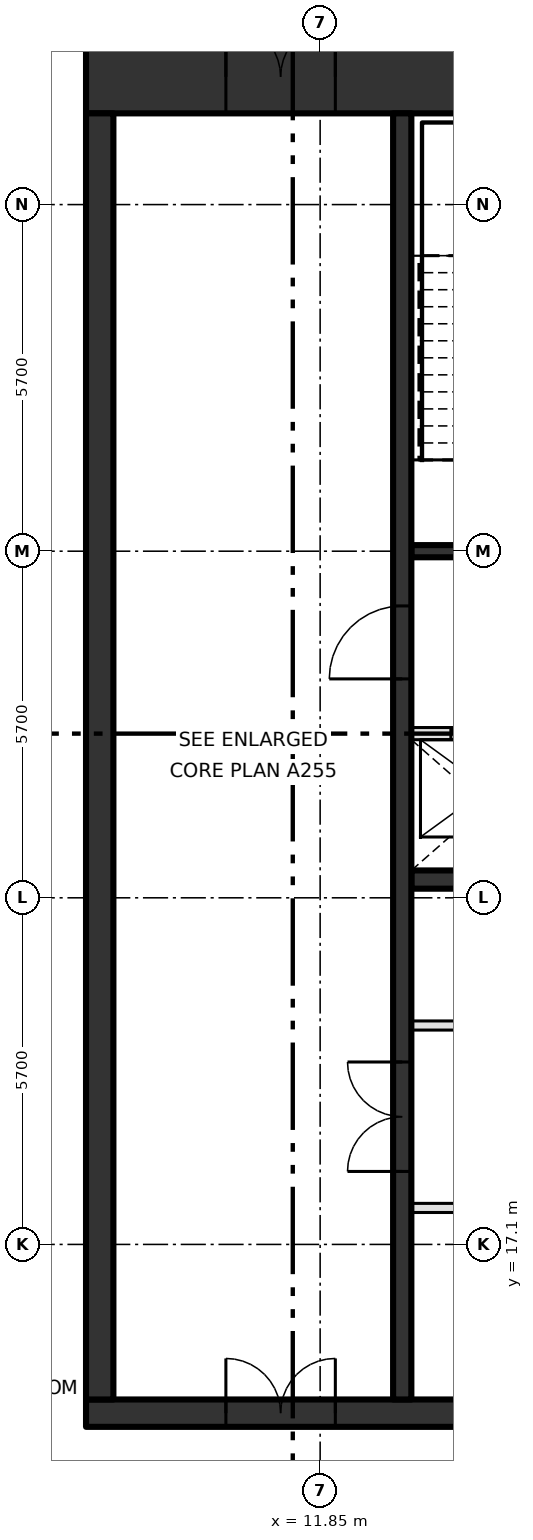
"""IFC4 building model, lengths in metres.
Left out: names, types, materials, properties, quantities, classifications, styles, units other than length and angle.
Written with IfcOpenShell. Run it as: python <this file> out.ifc"""

import sys

from ifc_helpers import new_model, si_unit, direction, frame, frame_2d, origin, place, context, subcontext, project, spatial, rectangle, extrude, element, fill, save


model = new_model("IFC4")
c1 = context("Model", 3, precision=1e-05, world=origin(), true_north=direction((0.0, 1.0)))
c2 = subcontext(c1, "Body", "Model", "MODEL_VIEW")
j1 = project(units=[si_unit("LENGTHUNIT", "METRE"), si_unit("PLANEANGLEUNIT", "RADIAN")], contexts=[c1])
p1 = place(None, origin())
s1 = spatial("IfcSite", under=j1, at=p1, CompositionType="ELEMENT")
p2 = place(p1, origin())
s2 = spatial("IfcBuilding", under=s1, at=p2, CompositionType="ELEMENT")
p3 = place(p2, frame((0.0, 0.0, 405.0)))
s3 = spatial("IfcBuildingStorey", under=s2, at=p3, CompositionType="ELEMENT", Elevation=405.0)
p4 = place(p3, frame((8.0, 14.325, -0.3), z_axis=(0.0, 0.0, 1.0), x_axis=(1.0, 0.0, 0.0)))
e1 = element("IfcWall", 1, at=p4, inside=s3, PredefinedType="SHEAR", context=c2, shape_type="SweptSolid", body=[
    extrude(rectangle(XDim=22.8, YDim=0.45, at=frame_2d((11.4, 0.0))), origin(), (0.0, 0.0, 1.0), 4.65),
])
p5 = place(p4, frame((2.3, 0.0, 0.3)))
e2 = element("IfcOpeningElement", 2, at=p5, cuts=e1, PredefinedType="OPENING", context=c2, shape_type="SweptSolid", body=[
    extrude(rectangle(XDim=1.8, YDim=2.1, at=frame_2d((0.9, 1.05))), frame((0.0, 0.235, 0.0), z_axis=(0.0, -1.0, 0.0), x_axis=(1.0, 0.0, 0.0)), (0.0, 0.0, 1.0), 0.47),
])
p6 = place(p3, frame((8.0, 36.3, -0.3), z_axis=(0.0, 0.0, 1.0), x_axis=(1.0, 0.0, 0.0)))
e3 = element("IfcWall", 3, at=p6, inside=s3, PredefinedType="SHEAR", context=c2, shape_type="SweptSolid", body=[
    extrude(rectangle(XDim=22.8, YDim=1.2, at=frame_2d((11.4, 0.0))), origin(), (0.0, 0.0, 1.0), 4.65),
])
p7 = place(p6, frame((2.3, 0.0, 0.3)))
e4 = element("IfcOpeningElement", 4, at=p7, cuts=e3, PredefinedType="OPENING", context=c2, shape_type="SweptSolid", body=[
    extrude(rectangle(XDim=1.8, YDim=2.1, at=frame_2d((0.9, 1.05))), frame((0.0, 0.61, 0.0), z_axis=(0.0, -1.0, 0.0), x_axis=(1.0, 0.0, 0.0)), (0.0, 0.0, 1.0), 1.22),
])
p8 = place(p3, frame((8.225, 14.55, -0.3), z_axis=(0.0, 0.0, 1.0), x_axis=(0.0, 1.0, 0.0)))
e5 = element("IfcWall", 5, at=p8, inside=s3, PredefinedType="SHEAR", context=c2, shape_type="SweptSolid", body=[
    extrude(rectangle(XDim=21.15, YDim=0.45, at=frame_2d((10.575, 0.0))), origin(), (0.0, 0.0, 1.0), 4.65),
])
p9 = place(p3, frame((13.35, 17.7, 0.0), z_axis=(0.0, 0.0, 1.0), x_axis=(1.0, 0.0, 0.0)))
e6 = element("IfcWall", 6, at=p9, inside=s3, PredefinedType="PARTITIONING", context=c2, shape_type="SweptSolid", body=[
    extrude(rectangle(XDim=13.425, YDim=0.15, at=frame_2d((6.712, 0.0))), origin(), (0.0, 0.0, 1.0), 4.35),
])
p10 = place(p9, frame((4.8, 0.0, 0.0)))
e7 = element("IfcOpeningElement", 7, at=p10, cuts=e6, PredefinedType="OPENING", context=c2, shape_type="SweptSolid", body=[
    extrude(rectangle(XDim=0.9, YDim=2.1, at=frame_2d((0.45, 1.05))), frame((0.0, 0.085, 0.0), z_axis=(0.0, -1.0, 0.0), x_axis=(1.0, 0.0, 0.0)), (0.0, 0.0, 1.0), 0.17),
])
p11 = place(p9, frame((11.55, 0.0, 0.0)))
e8 = element("IfcOpeningElement", 8, at=p11, cuts=e6, PredefinedType="OPENING", context=c2, shape_type="SweptSolid", body=[
    extrude(rectangle(XDim=0.9, YDim=2.1, at=frame_2d((0.45, 1.05))), frame((0.0, 0.085, 0.0), z_axis=(0.0, -1.0, 0.0), x_axis=(1.0, 0.0, 0.0)), (0.0, 0.0, 1.0), 0.17),
])
p12 = place(p3, frame((13.35, 20.7, 0.0), z_axis=(0.0, 0.0, 1.0), x_axis=(1.0, 0.0, 0.0)))
e9 = element("IfcWall", 9, at=p12, inside=s3, PredefinedType="PARTITIONING", context=c2, shape_type="SweptSolid", body=[
    extrude(rectangle(XDim=13.425, YDim=0.15, at=frame_2d((6.712, 0.0))), origin(), (0.0, 0.0, 1.0), 4.35),
])
p13 = place(p12, frame((6.15, 0.0, 0.0)))
e10 = element("IfcOpeningElement", 10, at=p13, cuts=e9, PredefinedType="OPENING", context=c2, shape_type="SweptSolid", body=[
    extrude(rectangle(XDim=0.9, YDim=2.1, at=frame_2d((0.45, 1.05))), frame((0.0, 0.085, 0.0), z_axis=(0.0, -1.0, 0.0), x_axis=(1.0, 0.0, 0.0)), (0.0, 0.0, 1.0), 0.17),
])
p14 = place(p3, frame((13.35, 23.1, 0.0), z_axis=(0.0, 0.0, 1.0), x_axis=(1.0, 0.0, 0.0)))
e11 = element("IfcWall", 11, at=p14, inside=s3, PredefinedType="SHEAR", context=c2, shape_type="SweptSolid", body=[
    extrude(rectangle(XDim=17.0, YDim=0.3, at=frame_2d((8.5, 0.0))), origin(), (0.0, 0.0, 1.0), 4.35),
])
p15 = place(p3, frame((13.35, 25.5, 0.0), z_axis=(0.0, 0.0, 1.0), x_axis=(1.0, 0.0, 0.0)))
e12 = element("IfcWall", 12, at=p15, inside=s3, PredefinedType="SOLIDWALL", context=c2, shape_type="SweptSolid", body=[
    extrude(rectangle(XDim=17.0, YDim=0.2, at=frame_2d((8.5, 0.0))), origin(), (0.0, 0.0, 1.0), 4.35),
])
p16 = place(p15, frame((0.65, 0.0, 0.0)))
e13 = element("IfcOpeningElement", 13, at=p16, cuts=e12, PredefinedType="OPENING", context=c2, shape_type="SweptSolid", body=[
    extrude(rectangle(XDim=1.1, YDim=2.1, at=frame_2d((0.55, 1.05))), frame((0.0, 0.11, 0.0), z_axis=(0.0, -1.0, 0.0), x_axis=(1.0, 0.0, 0.0)), (0.0, 0.0, 1.0), 0.22),
])
p17 = place(p15, frame((3.35, 0.0, 0.0)))
e14 = element("IfcOpeningElement", 14, at=p17, cuts=e12, PredefinedType="OPENING", context=c2, shape_type="SweptSolid", body=[
    extrude(rectangle(XDim=1.1, YDim=2.1, at=frame_2d((0.55, 1.05))), frame((0.0, 0.11, 0.0), z_axis=(0.0, -1.0, 0.0), x_axis=(1.0, 0.0, 0.0)), (0.0, 0.0, 1.0), 0.22),
])
p18 = place(p15, frame((6.05, 0.0, 0.0)))
e15 = element("IfcOpeningElement", 15, at=p18, cuts=e12, PredefinedType="OPENING", context=c2, shape_type="SweptSolid", body=[
    extrude(rectangle(XDim=1.1, YDim=2.1, at=frame_2d((0.55, 1.05))), frame((0.0, 0.11, 0.0), z_axis=(0.0, -1.0, 0.0), x_axis=(1.0, 0.0, 0.0)), (0.0, 0.0, 1.0), 0.22),
])
p19 = place(p15, frame((8.75, 0.0, 0.0)))
e16 = element("IfcOpeningElement", 16, at=p19, cuts=e12, PredefinedType="OPENING", context=c2, shape_type="SweptSolid", body=[
    extrude(rectangle(XDim=1.1, YDim=2.1, at=frame_2d((0.55, 1.05))), frame((0.0, 0.11, 0.0), z_axis=(0.0, -1.0, 0.0), x_axis=(1.0, 0.0, 0.0)), (0.0, 0.0, 1.0), 0.22),
])
p20 = place(p15, frame((13.0, 0.0, 0.0)))
e17 = element("IfcOpeningElement", 17, at=p20, cuts=e12, PredefinedType="OPENING", context=c2, shape_type="SweptSolid", body=[
    extrude(rectangle(XDim=0.9, YDim=2.1, at=frame_2d((0.45, 1.05))), frame((0.0, 0.11, 0.0), z_axis=(0.0, -1.0, 0.0), x_axis=(1.0, 0.0, 0.0)), (0.0, 0.0, 1.0), 0.22),
])
p21 = place(p3, frame((13.35, 28.5, 0.0), z_axis=(0.0, 0.0, 1.0), x_axis=(1.0, 0.0, 0.0)))
e18 = element("IfcWall", 18, at=p21, inside=s3, PredefinedType="SOLIDWALL", context=c2, shape_type="SweptSolid", body=[
    extrude(rectangle(XDim=6.75, YDim=0.2, at=frame_2d((3.375, 0.0))), origin(), (0.0, 0.0, 1.0), 4.35),
])
p22 = place(p21, frame((0.95, 0.0, 0.0)))
e19 = element("IfcOpeningElement", 19, at=p22, cuts=e18, PredefinedType="OPENING", context=c2, shape_type="SweptSolid", body=[
    extrude(rectangle(XDim=1.2, YDim=2.1, at=frame_2d((0.6, 1.05))), frame((0.0, 0.11, 0.0), z_axis=(0.0, -1.0, 0.0), x_axis=(1.0, 0.0, 0.0)), (0.0, 0.0, 1.0), 0.22),
])
p23 = place(p21, frame((3.75, 0.0, 0.0)))
e20 = element("IfcOpeningElement", 20, at=p23, cuts=e18, PredefinedType="OPENING", context=c2, shape_type="SweptSolid", body=[
    extrude(rectangle(XDim=1.1, YDim=2.1, at=frame_2d((0.55, 1.05))), frame((0.0, 0.11, 0.0), z_axis=(0.0, -1.0, 0.0), x_axis=(1.0, 0.0, 0.0)), (0.0, 0.0, 1.0), 0.22),
])
p24 = place(p3, frame((13.2, 14.55, 0.0), z_axis=(0.0, 0.0, 1.0), x_axis=(0.0, 1.0, 0.0)))
e21 = element("IfcWall", 21, at=p24, inside=s3, PredefinedType="SHEAR", context=c2, shape_type="SweptSolid", body=[
    extrude(rectangle(XDim=21.15, YDim=0.3, at=frame_2d((10.575, 0.0))), origin(), (0.0, 0.0, 1.0), 4.35),
])
p25 = place(p24, frame((3.75, 0.0, 0.0)))
e22 = element("IfcOpeningElement", 22, at=p25, cuts=e21, PredefinedType="OPENING", context=c2, shape_type="SweptSolid", body=[
    extrude(rectangle(XDim=1.8, YDim=2.1, at=frame_2d((0.9, 1.05))), frame((0.0, 0.16, 0.0), z_axis=(0.0, -1.0, 0.0), x_axis=(1.0, 0.0, 0.0)), (0.0, 0.0, 1.0), 0.32),
])
p26 = place(p24, frame((11.85, 0.0, 0.0)))
e23 = element("IfcOpeningElement", 23, at=p26, cuts=e21, PredefinedType="OPENING", context=c2, shape_type="SweptSolid", body=[
    extrude(rectangle(XDim=1.2, YDim=2.1, at=frame_2d((0.6, 1.05))), frame((0.0, 0.16, 0.0), z_axis=(0.0, -1.0, 0.0), x_axis=(1.0, 0.0, 0.0)), (0.0, 0.0, 1.0), 0.32),
])
p27 = place(p16, origin())
e24 = element("IfcDoor", 24, at=p27, inside=s3, OperationType="SLIDING_TO_LEFT", PredefinedType="DOOR", context=c2, shape_type="SweptSolid", body=[
    extrude(rectangle(XDim=1.1, YDim=2.1, at=frame_2d((0.55, 1.05))), frame((0.0, 0.025, 0.0), z_axis=(0.0, -1.0, 0.0), x_axis=(1.0, 0.0, 0.0)), (0.0, 0.0, 1.0), 0.05),
])
fill(e13, e24)
p28 = place(p25, origin())
e25 = element("IfcDoor", 25, at=p28, inside=s3, OperationType="DOUBLE_DOOR_SINGLE_SWING", PredefinedType="DOOR", context=c2, shape_type="SweptSolid", body=[
    extrude(rectangle(XDim=1.8, YDim=2.1, at=frame_2d((0.9, 1.05))), frame((0.0, 0.025, 0.0), z_axis=(0.0, -1.0, 0.0), x_axis=(1.0, 0.0, 0.0)), (0.0, 0.0, 1.0), 0.05),
])
fill(e22, e25)
p29 = place(p26, origin())
e26 = element("IfcDoor", 26, at=p29, inside=s3, OperationType="SINGLE_SWING_LEFT", PredefinedType="DOOR", context=c2, shape_type="SweptSolid", body=[
    extrude(rectangle(XDim=1.2, YDim=2.1, at=frame_2d((0.6, 1.05))), frame((0.0, 0.025, 0.0), z_axis=(0.0, -1.0, 0.0), x_axis=(1.0, 0.0, 0.0)), (0.0, 0.0, 1.0), 0.05),
])
fill(e23, e26)
p30 = place(p7, origin())
e27 = element("IfcDoor", 27, at=p30, inside=s3, OperationType="DOUBLE_DOOR_SINGLE_SWING", PredefinedType="DOOR", context=c2, shape_type="SweptSolid", body=[
    extrude(rectangle(XDim=1.8, YDim=2.1, at=frame_2d((0.9, 1.05))), frame((0.0, 0.025, 0.0), z_axis=(0.0, -1.0, 0.0), x_axis=(1.0, 0.0, 0.0)), (0.0, 0.0, 1.0), 0.05),
])
fill(e4, e27)
p31 = place(p5, origin())
e28 = element("IfcDoor", 28, at=p31, inside=s3, OperationType="DOUBLE_DOOR_SINGLE_SWING", PredefinedType="DOOR", context=c2, shape_type="SweptSolid", body=[
    extrude(rectangle(XDim=1.8, YDim=2.1, at=frame_2d((0.9, 1.05))), frame((0.0, 0.025, 0.0), z_axis=(0.0, -1.0, 0.0), x_axis=(1.0, 0.0, 0.0)), (0.0, 0.0, 1.0), 0.05),
])
fill(e2, e28)
save(model, sys.argv[1])
